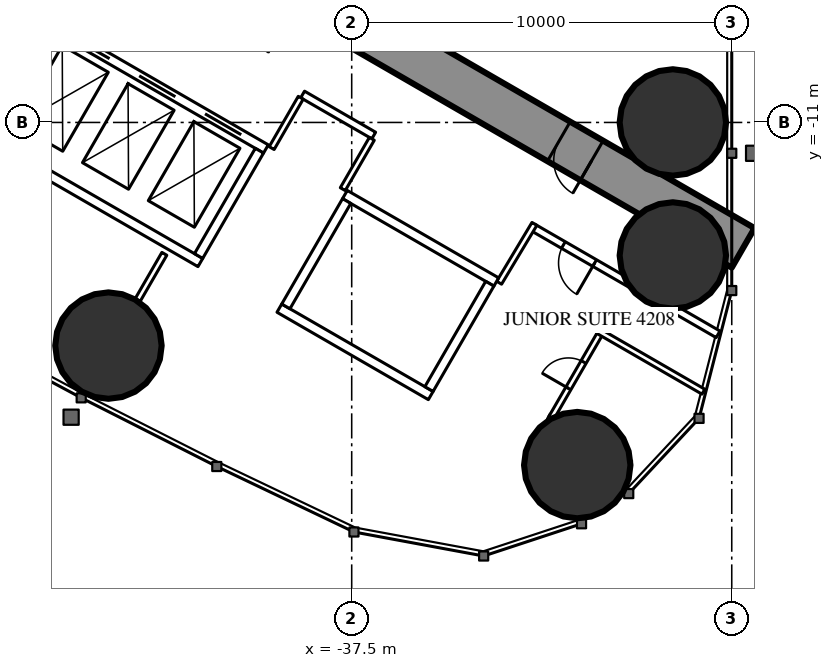
"""IFC4 building model, lengths in metres.
Left out: names, types, materials, properties, quantities, classifications, styles, units other than length and angle.
Written with IfcOpenShell. Run it as: python <this file> out.ifc"""

import sys

from ifc_helpers import new_model, si_unit, direction, frame, frame_2d, origin, origin_2d, place, context, subcontext, project, spatial, rectangle, circle, extrude, element, fill, save


model = new_model("IFC4")
c1 = context("Model", 3, precision=1e-05, world=origin(), true_north=direction((0.0, 1.0)))
c2 = subcontext(c1, "Body", "Model", "MODEL_VIEW")
j1 = project(units=[si_unit("LENGTHUNIT", "METRE"), si_unit("PLANEANGLEUNIT", "RADIAN")], contexts=[c1])
p1 = place(None, origin())
s1 = spatial("IfcSite", under=j1, at=p1, CompositionType="ELEMENT")
p2 = place(p1, origin())
s2 = spatial("IfcBuilding", under=s1, at=p2, CompositionType="ELEMENT")
p3 = place(p2, frame((0.0, 0.0, 159.8)))
s3 = spatial("IfcBuildingStorey", under=s2, at=p3, CompositionType="ELEMENT", Elevation=159.8)
for number, where, z_axis, x_axis in (
    (1, (-31.565, -20.016, 0.0), (0.0, 0.0, 1.0), (1.0, 0.0, 0.0)),
    (2, (-29.05, -11.0, 0.0), (0.0, 0.0, 1.0), (1.0, 0.0, 0.0)),
    (3, (-29.05, -14.5, 0.0), (0.0, 0.0, 1.0), (1.0, 0.0, 0.0)),
    (4, (-43.9, -16.871, 0.0), (0.0, 0.0, 1.0), (1.0, 0.0, 0.0)),
):
    element("IfcColumn", number, at=place(p3, frame(where, z_axis=z_axis, x_axis=x_axis)), inside=s3, PredefinedType="COLUMN", context=c2, shape_type="SweptSolid", body=[
        extrude(circle(Radius=1.4, at=origin_2d()), origin(), (0.0, 0.0, 1.0), 3.5),
    ])
p4 = place(p3, frame((-27.2, -14.3, 0.0), z_axis=(0.0, 0.0, 1.0), x_axis=(-0.866024021859, 0.500002393557, 0.0)))
e5 = element("IfcWall", 5, at=p4, inside=s3, PredefinedType="SHEAR", context=c2, shape_type="SweptSolid", body=[
    extrude(rectangle(XDim=27.907, YDim=1.2, at=frame_2d((13.954, 0.0))), origin(), (0.0, 0.0, 1.0), 3.5),
])
p5 = place(p4, frame((4.6, 0.0, 0.0)))
e6 = element("IfcOpeningElement", 6, at=p5, cuts=e5, PredefinedType="OPENING", context=c2, shape_type="SweptSolid", body=[
    extrude(rectangle(XDim=1.0, YDim=2.2, at=frame_2d((0.5, 1.1))), frame((0.0, 0.61, 0.0), z_axis=(0.0, -1.0, 0.0), x_axis=(1.0, 0.0, 0.0)), (0.0, 0.0, 1.0), 1.22),
])
p6 = place(p4, frame((13.395, 0.0, 0.0)))
e7 = element("IfcOpeningElement", 7, at=p6, cuts=e5, PredefinedType="OPENING", context=c2, shape_type="SweptSolid", body=[
    extrude(rectangle(XDim=1.8, YDim=2.2, at=frame_2d((0.9, 1.1))), frame((0.0, 0.61, 0.0), z_axis=(0.0, -1.0, 0.0), x_axis=(1.0, 0.0, 0.0)), (0.0, 0.0, 1.0), 1.22),
])
p7 = place(p3, frame((-42.429, -14.457, 0.0), z_axis=(0.0, 0.0, 1.0), x_axis=(-0.5000578829, -0.865991982497, 0.0)))
e8 = element("IfcWall", 8, at=p7, inside=s3, PredefinedType="PARTITIONING", context=c2, shape_type="SweptSolid", body=[
    extrude(rectangle(XDim=1.407, YDim=0.15, at=frame_2d((0.704, 0.0))), origin(), (0.0, 0.0, 1.0), 3.25),
])
p8 = place(p3, frame((-27.86, -16.575, 0.0), z_axis=(0.0, 0.0, 1.0), x_axis=(-0.866019269751, 0.500010624307, 0.0)))
e9 = element("IfcWall", 9, at=p8, inside=s3, PredefinedType="PARTITIONING", context=c2, shape_type="SweptSolid", body=[
    extrude(rectangle(XDim=5.623, YDim=0.2, at=frame_2d((2.811, 0.0))), origin(), (0.0, 0.0, 1.0), 3.25),
])
p9 = place(p8, frame((3.75, 0.0, 0.0)))
e10 = element("IfcOpeningElement", 10, at=p9, cuts=e9, PredefinedType="OPENING", context=c2, shape_type="SweptSolid", body=[
    extrude(rectangle(XDim=0.95, YDim=2.2, at=frame_2d((0.475, 1.1))), frame((0.0, 0.11, 0.0), z_axis=(0.0, -1.0, 0.0), x_axis=(1.0, 0.0, 0.0)), (0.0, 0.0, 1.0), 0.22),
])
p10 = place(p3, frame((-36.92, -11.344, 0.0), z_axis=(0.0, 0.0, 1.0), x_axis=(-0.866065156741, 0.499931139538, 0.0)))
e11 = element("IfcWall", 11, at=p10, inside=s3, PredefinedType="PARTITIONING", context=c2, shape_type="SweptSolid", body=[
    extrude(rectangle(XDim=2.16, YDim=0.2, at=frame_2d((1.08, 0.0))), origin(), (0.0, 0.0, 1.0), 3.25),
])
p11 = place(p3, frame((-33.621, -15.218, 0.0), z_axis=(0.0, 0.0, 1.0), x_axis=(0.514336634837, 0.857588377991, 0.0)))
e12 = element("IfcWall", 12, at=p11, inside=s3, PredefinedType="PARTITIONING", context=c2, shape_type="SweptSolid", body=[
    extrude(rectangle(XDim=1.805, YDim=0.15, at=frame_2d((0.903, 0.0))), origin(), (0.0, 0.0, 1.0), 3.25),
])
p12 = place(p3, frame((-36.97, -11.43, 0.0), z_axis=(0.0, 0.0, 1.0), x_axis=(-0.499985008713, -0.866034058835, 0.0)))
e13 = element("IfcWall", 13, at=p12, inside=s3, PredefinedType="PARTITIONING", context=c2, shape_type="SweptSolid", body=[
    extrude(rectangle(XDim=1.529, YDim=0.15, at=frame_2d((0.765, 0.0))), origin(), (0.0, 0.0, 1.0), 3.25),
])
p13 = place(p3, frame((-38.841, -10.35, 0.0), z_axis=(0.0, 0.0, 1.0), x_axis=(-0.499966498333, -0.866044745117, 0.0)))
e14 = element("IfcWall", 14, at=p13, inside=s3, PredefinedType="PARTITIONING", context=c2, shape_type="SweptSolid", body=[
    extrude(rectangle(XDim=1.53, YDim=0.15, at=frame_2d((0.765, 0.0))), origin(), (0.0, 0.0, 1.0), 3.25),
])
p14 = place(p3, frame((-30.17, -19.975, 0.0), z_axis=(0.0, 0.0, 1.0), x_axis=(-0.866006523861, 0.500032699561, 0.0)))
e15 = element("IfcWall", 15, at=p14, inside=s3, PredefinedType="PARTITIONING", context=c2, shape_type="SweptSolid", body=[
    extrude(rectangle(XDim=2.475, YDim=0.15, at=frame_2d((1.237, 0.0))), origin(), (0.0, 0.0, 1.0), 3.25),
])
p15 = place(p3, frame((-30.948, -16.524, 0.0), z_axis=(0.0, 0.0, 1.0), x_axis=(-0.500006934395, -0.866021400173, 0.0)))
e16 = element("IfcWall", 16, at=p15, inside=s3, PredefinedType="PARTITIONING", context=c2, shape_type="SweptSolid", body=[
    extrude(rectangle(XDim=2.6, YDim=0.15, at=frame_2d((1.3, 0.0))), origin(), (0.0, 0.0, 1.0), 2.3),
])
p16 = place(p15, frame((0.9, 0.0, 0.0)))
e17 = element("IfcOpeningElement", 17, at=p16, cuts=e16, PredefinedType="OPENING", context=c2, shape_type="SweptSolid", body=[
    extrude(rectangle(XDim=0.8, YDim=2.2, at=frame_2d((0.4, 1.1))), frame((0.0, 0.085, 0.0), z_axis=(0.0, -1.0, 0.0), x_axis=(1.0, 0.0, 0.0)), (0.0, 0.0, 1.0), 0.17),
])
p17 = place(p3, frame((-28.246, -18.084, 0.0), z_axis=(0.0, 0.0, 1.0), x_axis=(-0.866029063467, 0.49999366119, 0.0)))
e18 = element("IfcWall", 18, at=p17, inside=s3, PredefinedType="PARTITIONING", context=c2, shape_type="SweptSolid", body=[
    extrude(rectangle(XDim=3.195, YDim=0.15, at=frame_2d((1.597, 0.0))), origin(), (0.0, 0.0, 1.0), 2.45),
])
p18 = place(p3, frame((-33.696, -15.197, 0.0), z_axis=(0.0, 0.0, 1.0), x_axis=(-0.865976953817, 0.500083908417, 0.0)))
e19 = element("IfcWall", 19, at=p18, inside=s3, PredefinedType="PARTITIONING", context=c2, shape_type="SweptSolid", body=[
    extrude(rectangle(XDim=4.599, YDim=0.25, at=frame_2d((2.3, 0.0))), origin(), (0.0, 0.0, 1.0), 3.25),
])
p19 = place(p3, frame((-35.42, -18.186, 0.0), z_axis=(0.0, 0.0, 1.0), x_axis=(-0.865990227814, 0.50006092162, 0.0)))
e20 = element("IfcWall", 20, at=p19, inside=s3, PredefinedType="PARTITIONING", context=c2, shape_type="SweptSolid", body=[
    extrude(rectangle(XDim=4.6, YDim=0.25, at=frame_2d((2.3, 0.0))), origin(), (0.0, 0.0, 1.0), 3.25),
])
p20 = place(p3, frame((-33.866, -15.243, 0.0), z_axis=(0.0, 0.0, 1.0), x_axis=(-0.499929347863, -0.866066190972, 0.0)))
e21 = element("IfcWall", 21, at=p20, inside=s3, PredefinedType="PARTITIONING", context=c2, shape_type="SweptSolid", body=[
    extrude(rectangle(XDim=3.201, YDim=0.25, at=frame_2d((1.6, 0.0))), origin(), (0.0, 0.0, 1.0), 3.25),
])
p21 = place(p3, frame((-37.633, -13.068, 0.0), z_axis=(0.0, 0.0, 1.0), x_axis=(-0.499872130319, -0.866099216793, 0.0)))
e22 = element("IfcWall", 22, at=p21, inside=s3, PredefinedType="PARTITIONING", context=c2, shape_type="SweptSolid", body=[
    extrude(rectangle(XDim=3.2, YDim=0.25, at=frame_2d((1.6, 0.0))), origin(), (0.0, 0.0, 1.0), 3.25),
])
p22 = place(p3, frame((-39.758, -11.697, 0.0), z_axis=(0.0, 0.0, 1.0), x_axis=(-0.866024194504, 0.500002094529, 0.0)))
e23 = element("IfcWall", 23, at=p22, inside=s3, PredefinedType="PARTITIONING", context=c2, shape_type="SweptSolid", body=[
    extrude(rectangle(XDim=6.6, YDim=0.25, at=frame_2d((3.3, 0.0))), origin(), (0.0, 0.0, 1.0), 3.25),
])
p23 = place(p22, frame((0.75, 0.0, 0.0)))
e24 = element("IfcOpeningElement", 24, at=p23, cuts=e23, PredefinedType="OPENING", context=c2, shape_type="SweptSolid", body=[
    extrude(rectangle(XDim=1.1, YDim=2.2, at=frame_2d((0.55, 1.1))), frame((0.0, 0.135, 0.0), z_axis=(0.0, -1.0, 0.0), x_axis=(1.0, 0.0, 0.0)), (0.0, 0.0, 1.0), 0.27),
])
p24 = place(p22, frame((2.75, 0.0, 0.0)))
e25 = element("IfcOpeningElement", 25, at=p24, cuts=e23, PredefinedType="OPENING", context=c2, shape_type="SweptSolid", body=[
    extrude(rectangle(XDim=1.1, YDim=2.2, at=frame_2d((0.55, 1.1))), frame((0.0, 0.135, 0.0), z_axis=(0.0, -1.0, 0.0), x_axis=(1.0, 0.0, 0.0)), (0.0, 0.0, 1.0), 0.27),
])
p25 = place(p22, frame((4.75, 0.0, 0.0)))
e26 = element("IfcOpeningElement", 26, at=p25, cuts=e23, PredefinedType="OPENING", context=c2, shape_type="SweptSolid", body=[
    extrude(rectangle(XDim=1.1, YDim=2.2, at=frame_2d((0.55, 1.1))), frame((0.0, 0.135, 0.0), z_axis=(0.0, -1.0, 0.0), x_axis=(1.0, 0.0, 0.0)), (0.0, 0.0, 1.0), 0.27),
])
p26 = place(p3, frame((-41.482, -14.686, 0.0), z_axis=(0.0, 0.0, 1.0), x_axis=(-0.86603344179, 0.499986077507, 0.0)))
e27 = element("IfcWall", 27, at=p26, inside=s3, PredefinedType="PARTITIONING", context=c2, shape_type="SweptSolid", body=[
    extrude(rectangle(XDim=6.6, YDim=0.25, at=frame_2d((3.3, 0.0))), origin(), (0.0, 0.0, 1.0), 3.25),
])
for number, where, z_axis, x_axis in (
    (28, (-39.928, -11.743, 0.0), (0.0, 0.0, 1.0), (-0.5, -0.866, 0.0)),
    (29, (-45.428, -8.568, 0.0), (0.0, 0.0, 1.0), (-0.5, -0.866, 0.0)),
):
    element("IfcWall", number, at=place(p3, frame(where, z_axis=z_axis, x_axis=x_axis)), inside=s3, PredefinedType="PARTITIONING", context=c2, shape_type="SweptSolid", body=[
        extrude(rectangle(XDim=3.201, YDim=0.25, at=frame_2d((1.6, 0.0))), origin(), (0.0, 0.0, 1.0), 3.25),
    ])
p27 = place(p16, origin())
e30 = element("IfcDoor", 30, at=p27, inside=s3, OperationType="SINGLE_SWING_RIGHT", PredefinedType="DOOR", context=c2, shape_type="SweptSolid", body=[
    extrude(rectangle(XDim=0.8, YDim=2.2, at=frame_2d((0.4, 1.1))), frame((0.0, 0.025, 0.0), z_axis=(0.0, -1.0, 0.0), x_axis=(1.0, 0.0, 0.0)), (0.0, 0.0, 1.0), 0.05),
])
fill(e17, e30)
p28 = place(p9, origin())
e31 = element("IfcDoor", 31, at=p28, inside=s3, OperationType="SINGLE_SWING_LEFT", PredefinedType="DOOR", context=c2, shape_type="SweptSolid", body=[
    extrude(rectangle(XDim=0.95, YDim=2.2, at=frame_2d((0.475, 1.1))), frame((0.0, 0.025, 0.0), z_axis=(0.0, -1.0, 0.0), x_axis=(1.0, 0.0, 0.0)), (0.0, 0.0, 1.0), 0.05),
])
fill(e10, e31)
p29 = place(p5, origin())
e32 = element("IfcDoor", 32, at=p29, inside=s3, OperationType="SINGLE_SWING_LEFT", PredefinedType="DOOR", context=c2, shape_type="SweptSolid", body=[
    extrude(rectangle(XDim=1.0, YDim=2.2, at=frame_2d((0.5, 1.1))), frame((0.0, 0.025, 0.0), z_axis=(0.0, -1.0, 0.0), x_axis=(1.0, 0.0, 0.0)), (0.0, 0.0, 1.0), 0.05),
])
fill(e6, e32)
p30 = place(p23, origin())
e33 = element("IfcDoor", 33, at=p30, inside=s3, OperationType="DOUBLE_DOOR_SLIDING", PredefinedType="USERDEFINED", context=c2, shape_type="SweptSolid", body=[
    extrude(rectangle(XDim=1.1, YDim=2.2, at=frame_2d((0.55, 1.1))), frame((0.0, 0.025, 0.0), z_axis=(0.0, -1.0, 0.0), x_axis=(1.0, 0.0, 0.0)), (0.0, 0.0, 1.0), 0.05),
])
fill(e24, e33)
p31 = place(p24, origin())
e34 = element("IfcDoor", 34, at=p31, inside=s3, OperationType="DOUBLE_DOOR_SLIDING", PredefinedType="USERDEFINED", context=c2, shape_type="SweptSolid", body=[
    extrude(rectangle(XDim=1.1, YDim=2.2, at=frame_2d((0.55, 1.1))), frame((0.0, 0.025, 0.0), z_axis=(0.0, -1.0, 0.0), x_axis=(1.0, 0.0, 0.0)), (0.0, 0.0, 1.0), 0.05),
])
fill(e25, e34)
p32 = place(p25, origin())
e35 = element("IfcDoor", 35, at=p32, inside=s3, OperationType="DOUBLE_DOOR_SLIDING", PredefinedType="USERDEFINED", context=c2, shape_type="SweptSolid", body=[
    extrude(rectangle(XDim=1.1, YDim=2.2, at=frame_2d((0.55, 1.1))), frame((0.0, 0.025, 0.0), z_axis=(0.0, -1.0, 0.0), x_axis=(1.0, 0.0, 0.0)), (0.0, 0.0, 1.0), 0.05),
])
fill(e26, e35)
save(model, sys.argv[1])
